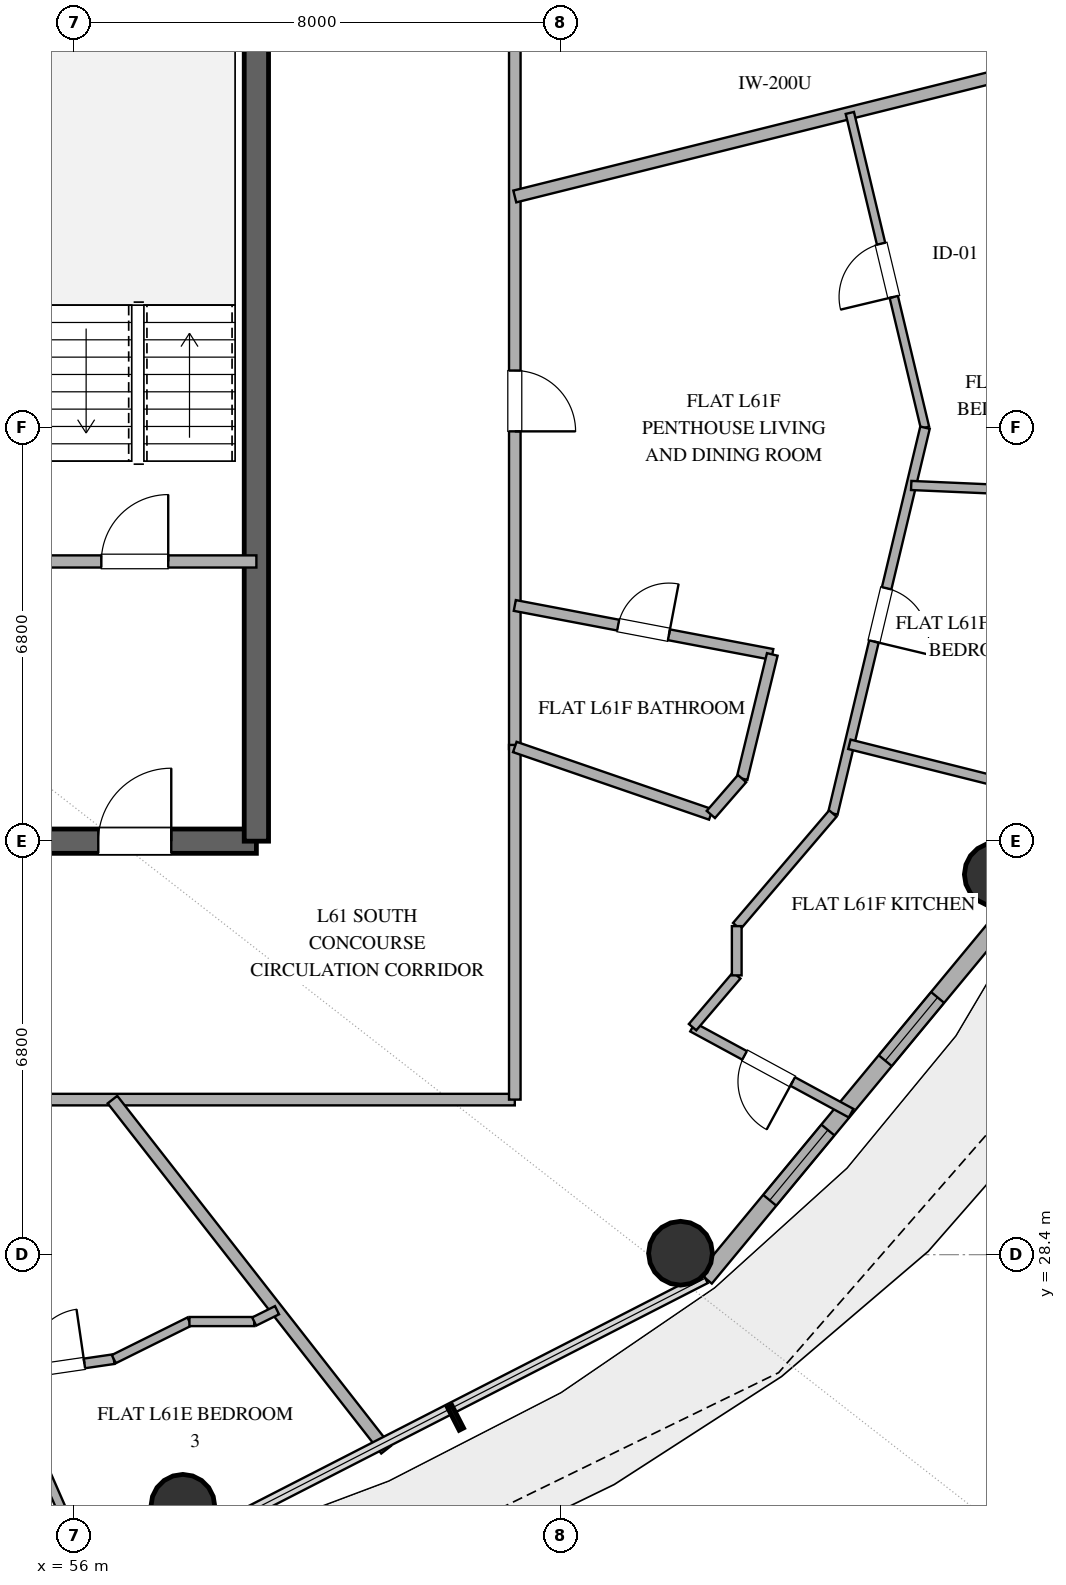
"""IFC4 building model, lengths in metres.
Left out: names, types, materials, properties, quantities, classifications, styles, units other than length and angle.
Written with IfcOpenShell. Run it as: python <this file> out.ifc"""

import sys

from ifc_helpers import new_model, si_unit, direction, frame, frame_2d, origin, origin_2d, place, context, subcontext, project, spatial, rectangle, hollow_circle, extrude, element, fill, save


model = new_model("IFC4")
c1 = context("Model", 3, precision=1e-05, world=origin(), true_north=direction((0.0, 1.0)))
c2 = subcontext(c1, "Body", "Model", "MODEL_VIEW")
j1 = project(units=[si_unit("LENGTHUNIT", "METRE"), si_unit("PLANEANGLEUNIT", "RADIAN")], contexts=[c1])
p1 = place(None, origin())
s1 = spatial("IfcSite", under=j1, at=p1, CompositionType="ELEMENT")
p2 = place(p1, origin())
s2 = spatial("IfcBuilding", under=s1, at=p2, CompositionType="ELEMENT")
p3 = place(p2, frame((0.0, 0.0, 238.8)))
s3 = spatial("IfcBuildingStorey", under=s2, at=p3, CompositionType="ELEMENT", Elevation=238.8)
p4 = place(p3, frame((55.0, 35.2, 0.0), z_axis=(0.0, 0.0, 1.0), x_axis=(1.0, 0.0, 0.0)))
e1 = element("IfcWall", 1, at=p4, inside=s3, PredefinedType="SHEAR", context=c2, shape_type="SweptSolid", body=[
    extrude(rectangle(XDim=4.0, YDim=0.4, at=frame_2d((2.0, 0.0))), origin(), (0.0, 0.0, 1.0), 3.36),
])
p5 = place(p4, frame((1.4, 0.0, 0.0)))
e2 = element("IfcOpeningElement", 2, at=p5, cuts=e1, PredefinedType="OPENING", context=c2, shape_type="SweptSolid", body=[
    extrude(rectangle(XDim=1.2, YDim=2.15, at=frame_2d((0.6, 1.075))), frame((0.0, 0.21, 0.0), z_axis=(0.0, -1.0, 0.0), x_axis=(1.0, 0.0, 0.0)), (0.0, 0.0, 1.0), 0.42),
])
p6 = place(p3, frame((59.0, 35.2, 0.0), z_axis=(0.0, 0.0, 1.0), x_axis=(0.0, 1.0, 0.0)))
e3 = element("IfcWall", 3, at=p6, inside=s3, PredefinedType="SHEAR", context=c2, shape_type="SweptSolid", body=[
    extrude(rectangle(XDim=13.6, YDim=0.4, at=frame_2d((6.8, 0.0))), origin(), (0.0, 0.0, 1.0), 3.36),
])
for number, where, z_axis, x_axis in (
    (4, (57.791, 24.261, 0.0), (0.0, 0.0, 1.0), (1.0, 0.0, 0.0)),
    (5, (65.975, 28.424, 0.0), (0.0, 0.0, 1.0), (1.0, 0.0, 0.0)),
    (6, (71.169, 34.653, 0.0), (0.0, 0.0, 1.0), (1.0, 0.0, 0.0)),
):
    element("IfcColumn", number, at=place(p3, frame(where, z_axis=z_axis, x_axis=x_axis)), inside=s3, PredefinedType="COLUMN", context=c2, shape_type="SweptSolid", body=[
        extrude(hollow_circle(Radius=0.525, WallThickness=0.028, at=origin_2d()), origin(), (0.0, 0.0, 1.0), 3.36),
    ])
p7 = place(p3, frame((66.383, 28.013, 0.0), z_axis=(0.0, 0.0, 1.0), x_axis=(0.63761509934, 0.770355103243, 0.0)))
e7 = element("IfcWall", 7, at=p7, inside=s3, PredefinedType="SOLIDWALL", context=c2, shape_type="SweptSolid", body=[
    extrude(rectangle(XDim=8.33, YDim=0.28, at=frame_2d((4.165, 0.0))), origin(), (0.0, 0.0, 1.0), 3.36),
])
p8 = place(p7, frame((1.663, 0.0, 0.85)))
e8 = element("IfcOpeningElement", 8, at=p8, cuts=e7, PredefinedType="OPENING", context=c2, shape_type="SweptSolid", body=[
    extrude(rectangle(XDim=1.5, YDim=1.8, at=frame_2d((0.75, 0.9))), frame((0.0, 0.15, 0.0), z_axis=(0.0, -1.0, 0.0), x_axis=(1.0, 0.0, 0.0)), (0.0, 0.0, 1.0), 0.3),
])
p9 = place(p7, frame((4.643, 0.0, 0.85)))
e9 = element("IfcOpeningElement", 9, at=p9, cuts=e7, PredefinedType="OPENING", context=c2, shape_type="SweptSolid", body=[
    extrude(rectangle(XDim=1.35, YDim=1.8, at=frame_2d((0.675, 0.9))), frame((0.0, 0.15, 0.0), z_axis=(0.0, -1.0, 0.0), x_axis=(1.0, 0.0, 0.0)), (0.0, 0.0, 1.0), 0.3),
])
p10 = place(p3, frame((55.0, 39.8, 0.0), z_axis=(0.0, 0.0, 1.0), x_axis=(1.0, 0.0, 0.0)))
e10 = element("IfcWall", 10, at=p10, inside=s3, PredefinedType="SOLIDWALL", context=c2, shape_type="SweptSolid", body=[
    extrude(rectangle(XDim=4.0, YDim=0.2, at=frame_2d((2.0, 0.0))), origin(), (0.0, 0.0, 1.0), 2.72),
])
p11 = place(p10, frame((1.45, 0.0, 0.0)))
e11 = element("IfcOpeningElement", 11, at=p11, cuts=e10, PredefinedType="OPENING", context=c2, shape_type="SweptSolid", body=[
    extrude(rectangle(XDim=1.1, YDim=2.15, at=frame_2d((0.55, 1.075))), frame((0.0, 0.11, 0.0), z_axis=(0.0, -1.0, 0.0), x_axis=(1.0, 0.0, 0.0)), (0.0, 0.0, 1.0), 0.22),
])
p12 = place(p3, frame((63.25, 30.95, 0.0), z_axis=(0.0, 0.0, 1.0), x_axis=(-1.0, 0.0, 0.0)))
e12 = element("IfcWall", 12, at=p12, inside=s3, PredefinedType="PARTITIONING", context=c2, shape_type="SweptSolid", body=[
    extrude(rectangle(XDim=19.715, YDim=0.19, at=frame_2d((9.857, 0.0))), origin(), (0.0, 0.0, 1.0), 2.72),
])
p13 = place(p12, frame((11.632, 0.0, 0.0)))
e13 = element("IfcOpeningElement", 13, at=p13, cuts=e12, PredefinedType="OPENING", context=c2, shape_type="SweptSolid", body=[
    extrude(rectangle(XDim=1.0, YDim=2.2, at=frame_2d((0.5, 1.1))), frame((0.0, 0.105, 0.0), z_axis=(0.0, -1.0, 0.0), x_axis=(1.0, 0.0, 0.0)), (0.0, 0.0, 1.0), 0.21),
])
p14 = place(p3, frame((63.25, 53.05, 0.0), z_axis=(0.0, 0.0, 1.0), x_axis=(0.0, -1.0, 0.0)))
e14 = element("IfcWall", 14, at=p14, inside=s3, PredefinedType="PARTITIONING", context=c2, shape_type="SweptSolid", body=[
    extrude(rectangle(XDim=16.335, YDim=0.19, at=frame_2d((8.167, 0.0))), origin(), (0.0, 0.0, 1.0), 2.72),
])
p15 = place(p14, frame((3.14, 0.0, 0.0)))
e15 = element("IfcOpeningElement", 15, at=p15, cuts=e14, PredefinedType="OPENING", context=c2, shape_type="SweptSolid", body=[
    extrude(rectangle(XDim=1.0, YDim=2.2, at=frame_2d((0.5, 1.1))), frame((0.0, 0.105, 0.0), z_axis=(0.0, -1.0, 0.0), x_axis=(1.0, 0.0, 0.0)), (0.0, 0.0, 1.0), 0.21),
])
p16 = place(p14, frame((10.111, 0.0, 0.0)))
e16 = element("IfcOpeningElement", 16, at=p16, cuts=e14, PredefinedType="OPENING", context=c2, shape_type="SweptSolid", body=[
    extrude(rectangle(XDim=1.0, YDim=2.2, at=frame_2d((0.5, 1.1))), frame((0.0, 0.105, 0.0), z_axis=(0.0, -1.0, 0.0), x_axis=(1.0, 0.0, 0.0)), (0.0, 0.0, 1.0), 0.21),
])
p17 = place(p3, frame((63.25, 36.783, 0.0), z_axis=(0.0, 0.0, 1.0), x_axis=(0.0, -1.0, 0.0)))
e17 = element("IfcWall", 17, at=p17, inside=s3, PredefinedType="PARTITIONING", context=c2, shape_type="SweptSolid", body=[
    extrude(rectangle(XDim=5.833, YDim=0.19, at=frame_2d((2.917, 0.0))), origin(), (0.0, 0.0, 1.0), 2.72),
])
p18 = place(p3, frame((63.25, 45.802, 0.0), z_axis=(0.0, 0.0, 1.0), x_axis=(0.970293772743, 0.241929730659, 0.0)))
e18 = element("IfcWall", 18, at=p18, inside=s3, PredefinedType="PARTITIONING", context=c2, shape_type="SweptSolid", body=[
    extrude(rectangle(XDim=9.197, YDim=0.2, at=frame_2d((4.599, 0.0))), origin(), (0.0, 0.0, 1.0), 2.72),
])
p19 = place(p3, frame((69.996, 42.0, 0.0), z_axis=(0.0, 0.0, 1.0), x_axis=(-0.232321322639, 0.972639091877, 0.0)))
e19 = element("IfcWall", 19, at=p19, inside=s3, PredefinedType="PARTITIONING", context=c2, shape_type="SweptSolid", body=[
    extrude(rectangle(XDim=5.322, YDim=0.14, at=frame_2d((2.661, 0.0))), origin(), (0.0, 0.0, 1.0), 2.72),
])
p20 = place(p19, frame((2.211, 0.0, 0.0)))
e20 = element("IfcOpeningElement", 20, at=p20, cuts=e19, PredefinedType="OPENING", context=c2, shape_type="SweptSolid", body=[
    extrude(rectangle(XDim=0.9, YDim=2.1, at=frame_2d((0.45, 1.05))), frame((0.0, 0.08, 0.0), z_axis=(0.0, -1.0, 0.0), x_axis=(1.0, 0.0, 0.0)), (0.0, 0.0, 1.0), 0.16),
])
p21 = place(p3, frame((69.996, 42.0, 0.0), z_axis=(0.0, 0.0, 1.0), x_axis=(-0.232298462197, -0.972644551962, 0.0)))
e21 = element("IfcWall", 21, at=p21, inside=s3, PredefinedType="PLUMBINGWALL", context=c2, shape_type="SweptSolid", body=[
    extrude(rectangle(XDim=6.523, YDim=0.16, at=frame_2d((3.262, 0.0))), origin(), (0.0, 0.0, 1.0), 2.72),
])
p22 = place(p21, frame((2.715, 0.0, 0.0)))
e22 = element("IfcOpeningElement", 22, at=p22, cuts=e21, PredefinedType="OPENING", context=c2, shape_type="SweptSolid", body=[
    extrude(rectangle(XDim=0.9, YDim=2.1, at=frame_2d((0.45, 1.05))), frame((0.0, 0.09, 0.0), z_axis=(0.0, -1.0, 0.0), x_axis=(1.0, 0.0, 0.0)), (0.0, 0.0, 1.0), 0.18),
])
p23 = place(p3, frame((56.633, 30.95, 0.0), z_axis=(0.0, 0.0, 1.0), x_axis=(0.615657656631, -0.788013737083, 0.0)))
e23 = element("IfcWall", 23, at=p23, inside=s3, PredefinedType="PARTITIONING", context=c2, shape_type="SweptSolid", body=[
    extrude(rectangle(XDim=7.308, YDim=0.2, at=frame_2d((3.654, 0.0))), origin(), (0.0, 0.0, 1.0), 2.72),
])
p24 = place(p3, frame((63.25, 39.076, 0.0), z_axis=(0.0, 0.0, 1.0), x_axis=(0.982398995864, -0.186794574134, 0.0)))
e24 = element("IfcWall", 24, at=p24, inside=s3, PredefinedType="PLUMBINGWALL", context=c2, shape_type="SweptSolid", body=[
    extrude(rectangle(XDim=4.311, YDim=0.18, at=frame_2d((2.155, 0.0))), origin(), (0.0, 0.0, 1.0), 2.72),
])
p25 = place(p24, frame((1.73, 0.0, 0.0)))
e25 = element("IfcOpeningElement", 25, at=p25, cuts=e24, PredefinedType="OPENING", context=c2, shape_type="SweptSolid", body=[
    extrude(rectangle(XDim=0.85, YDim=2.1, at=frame_2d((0.425, 1.05))), frame((0.0, 0.1, 0.0), z_axis=(0.0, -1.0, 0.0), x_axis=(1.0, 0.0, 0.0)), (0.0, 0.0, 1.0), 0.2),
])
p26 = place(p3, frame((73.312, 40.895, 0.0), z_axis=(0.0, 0.0, 1.0), x_axis=(-0.999049912793, 0.043580635022, 0.0)))
e26 = element("IfcWall", 26, at=p26, inside=s3, PredefinedType="PARTITIONING", context=c2, shape_type="SweptSolid", body=[
    extrude(rectangle(XDim=3.546, YDim=0.15, at=frame_2d((1.773, 0.0))), origin(), (0.0, 0.0, 1.0), 2.72),
])
p27 = place(p3, frame((72.166, 35.937, 0.0), z_axis=(0.0, 0.0, 1.0), x_axis=(-0.96994628441, 0.24331914302, 0.0)))
e27 = element("IfcWall", 27, at=p27, inside=s3, PredefinedType="PLUMBINGWALL", context=c2, shape_type="SweptSolid", body=[
    extrude(rectangle(XDim=3.519, YDim=0.16, at=frame_2d((1.759, 0.0))), origin(), (0.0, 0.0, 1.0), 2.72),
])
p28 = place(p3, frame((66.474, 35.639, 0.0), z_axis=(0.0, 0.0, 1.0), x_axis=(-0.945522773294, 0.325555963211, 0.0)))
e28 = element("IfcWall", 28, at=p28, inside=s3, PredefinedType="PLUMBINGWALL", context=c2, shape_type="SweptSolid", body=[
    extrude(rectangle(XDim=3.41, YDim=0.18, at=frame_2d((1.705, 0.0))), origin(), (0.0, 0.0, 1.0), 2.72),
])
p29 = place(p3, frame((48.0, 25.42, 0.0), z_axis=(0.0, 0.0, 1.0), x_axis=(0.989540121389, 0.144257922351, 0.0)))
e29 = element("IfcWall", 29, at=p29, inside=s3, PredefinedType="PLUMBINGWALL", context=c2, shape_type="SweptSolid", body=[
    extrude(rectangle(XDim=8.746, YDim=0.16, at=frame_2d((4.373, 0.0))), origin(), (0.0, 0.0, 1.0), 2.72),
])
p30 = place(p29, frame((4.765, 0.0, 0.0)))
e30 = element("IfcOpeningElement", 30, at=p30, cuts=e29, PredefinedType="OPENING", context=c2, shape_type="SweptSolid", body=[
    extrude(rectangle(XDim=0.9, YDim=2.1, at=frame_2d((0.45, 1.05))), frame((0.0, 0.09, 0.0), z_axis=(0.0, -1.0, 0.0), x_axis=(1.0, 0.0, 0.0)), (0.0, 0.0, 1.0), 0.18),
])
p31 = place(p29, frame((1.927, 0.0, 0.0)))
e31 = element("IfcOpeningElement", 31, at=p31, cuts=e29, PredefinedType="OPENING", context=c2, shape_type="SweptSolid", body=[
    extrude(rectangle(XDim=0.9, YDim=2.1, at=frame_2d((0.45, 1.05))), frame((0.0, 0.09, 0.0), z_axis=(0.0, -1.0, 0.0), x_axis=(1.0, 0.0, 0.0)), (0.0, 0.0, 1.0), 0.18),
])
p32 = place(p29, frame((7.358, 0.0, 0.0)))
e32 = element("IfcOpeningElement", 32, at=p32, cuts=e29, PredefinedType="OPENING", context=c2, shape_type="SweptSolid", body=[
    extrude(rectangle(XDim=0.9, YDim=2.1, at=frame_2d((0.45, 1.05))), frame((0.0, 0.09, 0.0), z_axis=(0.0, -1.0, 0.0), x_axis=(1.0, 0.0, 0.0)), (0.0, 0.0, 1.0), 0.18),
])
p33 = place(p3, frame((54.831, 26.416, 0.0), z_axis=(0.0, 0.0, 1.0), x_axis=(0.401469388376, -0.915872442099, 0.0)))
e33 = element("IfcWall", 33, at=p33, inside=s3, PredefinedType="PARTITIONING", context=c2, shape_type="SweptSolid", body=[
    extrude(rectangle(XDim=3.366, YDim=0.15, at=frame_2d((1.683, 0.0))), origin(), (0.0, 0.0, 1.0), 2.72),
])
p34 = place(p3, frame((68.781, 30.727, 0.0), z_axis=(0.0, 0.0, 1.0), x_axis=(-0.878981574643, 0.476855734408, 0.0)))
e34 = element("IfcWall", 34, at=p34, inside=s3, PredefinedType="PLUMBINGWALL", context=c2, shape_type="SweptSolid", body=[
    extrude(rectangle(XDim=2.966, YDim=0.16, at=frame_2d((1.483, 0.0))), origin(), (0.0, 0.0, 1.0), 2.72),
])
p35 = place(p34, frame((1.093, 0.0, 0.0)))
e35 = element("IfcOpeningElement", 35, at=p35, cuts=e34, PredefinedType="OPENING", context=c2, shape_type="SweptSolid", body=[
    extrude(rectangle(XDim=0.9, YDim=2.1, at=frame_2d((0.45, 1.05))), frame((0.0, 0.09, 0.0), z_axis=(0.0, -1.0, 0.0), x_axis=(1.0, 0.0, 0.0)), (0.0, 0.0, 1.0), 0.18),
])
p36 = place(p3, frame((66.9, 33.803, 0.0), z_axis=(0.0, 0.0, 1.0), x_axis=(0.649270866973, 0.760557257082, 0.0)))
e36 = element("IfcWall", 36, at=p36, inside=s3, PredefinedType="PLUMBINGWALL", context=c2, shape_type="SweptSolid", body=[
    extrude(rectangle(XDim=2.435, YDim=0.16, at=frame_2d((1.218, 0.0))), origin(), (0.0, 0.0, 1.0), 2.72),
])
p37 = place(p3, frame((67.485, 38.271, 0.0), z_axis=(0.0, 0.0, 1.0), x_axis=(-0.236517575433, -0.971627210668, 0.0)))
e37 = element("IfcWall", 37, at=p37, inside=s3, PredefinedType="PLUMBINGWALL", context=c2, shape_type="SweptSolid", body=[
    extrude(rectangle(XDim=2.102, YDim=0.18, at=frame_2d((1.051, 0.0))), origin(), (0.0, 0.0, 1.0), 2.72),
])
p38 = place(p3, frame((57.899, 27.3, 0.0), z_axis=(0.0, 0.0, 1.0), x_axis=(-0.895584310315, -0.444891833053, 0.0)))
e38 = element("IfcWall", 38, at=p38, inside=s3, PredefinedType="PARTITIONING", context=c2, shape_type="SweptSolid", body=[
    extrude(rectangle(XDim=1.389, YDim=0.15, at=frame_2d((0.694, 0.0))), origin(), (0.0, 0.0, 1.0), 2.72),
])
p39 = place(p3, frame((66.174, 32.141, 0.0), z_axis=(0.0, 0.0, 1.0), x_axis=(0.648939178463, 0.760840287219, 0.0)))
e39 = element("IfcWall", 39, at=p39, inside=s3, PredefinedType="PLUMBINGWALL", context=c2, shape_type="SweptSolid", body=[
    extrude(rectangle(XDim=1.119, YDim=0.16, at=frame_2d((0.56, 0.0))), origin(), (0.0, 0.0, 1.0), 2.72),
])
p40 = place(p3, frame((58.964, 27.3, 0.0), z_axis=(0.0, 0.0, 1.0), x_axis=(-1.0, 0.0, 0.0)))
e40 = element("IfcWall", 40, at=p40, inside=s3, PredefinedType="PARTITIONING", context=c2, shape_type="SweptSolid", body=[
    extrude(rectangle(XDim=1.065, YDim=0.15, at=frame_2d((0.533, 0.0))), origin(), (0.0, 0.0, 1.0), 2.72),
])
p41 = place(p3, frame((66.9, 32.993, 0.0), z_axis=(0.0, 0.0, 1.0), x_axis=(0.0, 1.0, 0.0)))
e41 = element("IfcWall", 41, at=p41, inside=s3, PredefinedType="PLUMBINGWALL", context=c2, shape_type="SweptSolid", body=[
    extrude(rectangle(XDim=0.81, YDim=0.16, at=frame_2d((0.405, 0.0))), origin(), (0.0, 0.0, 1.0), 2.72),
])
p42 = place(p3, frame((66.988, 36.229, 0.0), z_axis=(0.0, 0.0, 1.0), x_axis=(-0.656402785683, -0.754410619589, 0.0)))
e42 = element("IfcWall", 42, at=p42, inside=s3, PredefinedType="PLUMBINGWALL", context=c2, shape_type="SweptSolid", body=[
    extrude(rectangle(XDim=0.782, YDim=0.18, at=frame_2d((0.391, 0.0))), origin(), (0.0, 0.0, 1.0), 2.72),
])
p43 = place(p3, frame((59.339, 27.487, 0.0), z_axis=(0.0, 0.0, 1.0), x_axis=(-0.895473432012, -0.445114965554, 0.0)))
e43 = element("IfcWall", 43, at=p43, inside=s3, PredefinedType="PARTITIONING", context=c2, shape_type="SweptSolid", body=[
    extrude(rectangle(XDim=0.419, YDim=0.15, at=frame_2d((0.209, 0.0))), origin(), (0.0, 0.0, 1.0), 2.72),
])
p44 = place(p8, origin())
e44 = element("IfcWindow", 44, at=p44, inside=s3, PartitioningType="SINGLE_PANEL", PredefinedType="WINDOW", context=c2, shape_type="SweptSolid", body=[
    extrude(rectangle(XDim=1.5, YDim=1.8, at=frame_2d((0.75, 0.9))), frame((0.0, 0.03, 0.0), z_axis=(0.0, -1.0, 0.0), x_axis=(1.0, 0.0, 0.0)), (0.0, 0.0, 1.0), 0.06),
])
fill(e8, e44)
p45 = place(p9, origin())
e45 = element("IfcWindow", 45, at=p45, inside=s3, PartitioningType="SINGLE_PANEL", PredefinedType="WINDOW", context=c2, shape_type="SweptSolid", body=[
    extrude(rectangle(XDim=1.35, YDim=1.8, at=frame_2d((0.675, 0.9))), frame((0.0, 0.03, 0.0), z_axis=(0.0, -1.0, 0.0), x_axis=(1.0, 0.0, 0.0)), (0.0, 0.0, 1.0), 0.06),
])
fill(e9, e45)
p46 = place(p5, origin())
e46 = element("IfcDoor", 46, at=p46, inside=s3, OperationType="SINGLE_SWING_RIGHT", PredefinedType="DOOR", context=c2, shape_type="SweptSolid", body=[
    extrude(rectangle(XDim=1.2, YDim=2.15, at=frame_2d((0.6, 1.075))), frame((0.0, 0.025, 0.0), z_axis=(0.0, -1.0, 0.0), x_axis=(1.0, 0.0, 0.0)), (0.0, 0.0, 1.0), 0.05),
])
fill(e2, e46)
p47 = place(p11, origin())
e47 = element("IfcDoor", 47, at=p47, inside=s3, OperationType="SINGLE_SWING_RIGHT", PredefinedType="DOOR", context=c2, shape_type="SweptSolid", body=[
    extrude(rectangle(XDim=1.1, YDim=2.15, at=frame_2d((0.55, 1.075))), frame((0.0, 0.025, 0.0), z_axis=(0.0, -1.0, 0.0), x_axis=(1.0, 0.0, 0.0)), (0.0, 0.0, 1.0), 0.05),
])
fill(e11, e47)
p48 = place(p16, origin())
e48 = element("IfcDoor", 48, at=p48, inside=s3, OperationType="SINGLE_SWING_RIGHT", PredefinedType="DOOR", context=c2, shape_type="SweptSolid", body=[
    extrude(rectangle(XDim=1.0, YDim=2.2, at=frame_2d((0.5, 1.1))), frame((0.0, 0.025, 0.0), z_axis=(0.0, -1.0, 0.0), x_axis=(1.0, 0.0, 0.0)), (0.0, 0.0, 1.0), 0.05),
])
fill(e16, e48)
p49 = place(p20, origin())
e49 = element("IfcDoor", 49, at=p49, inside=s3, OperationType="SINGLE_SWING_LEFT", PredefinedType="DOOR", context=c2, shape_type="SweptSolid", body=[
    extrude(rectangle(XDim=0.9, YDim=2.1, at=frame_2d((0.45, 1.05))), frame((0.0, 0.025, 0.0), z_axis=(0.0, -1.0, 0.0), x_axis=(1.0, 0.0, 0.0)), (0.0, 0.0, 1.0), 0.05),
])
fill(e20, e49)
p50 = place(p22, origin())
e50 = element("IfcDoor", 50, at=p50, inside=s3, OperationType="SINGLE_SWING_RIGHT", PredefinedType="DOOR", context=c2, shape_type="SweptSolid", body=[
    extrude(rectangle(XDim=0.9, YDim=2.1, at=frame_2d((0.45, 1.05))), frame((0.0, 0.025, 0.0), z_axis=(0.0, -1.0, 0.0), x_axis=(1.0, 0.0, 0.0)), (0.0, 0.0, 1.0), 0.05),
])
fill(e22, e50)
p51 = place(p25, origin())
e51 = element("IfcDoor", 51, at=p51, inside=s3, OperationType="SINGLE_SWING_RIGHT", PredefinedType="DOOR", context=c2, shape_type="SweptSolid", body=[
    extrude(rectangle(XDim=0.85, YDim=2.1, at=frame_2d((0.425, 1.05))), frame((0.0, 0.025, 0.0), z_axis=(0.0, -1.0, 0.0), x_axis=(1.0, 0.0, 0.0)), (0.0, 0.0, 1.0), 0.05),
])
fill(e25, e51)
p52 = place(p32, origin())
e52 = element("IfcDoor", 52, at=p52, inside=s3, OperationType="SINGLE_SWING_RIGHT", PredefinedType="DOOR", context=c2, shape_type="SweptSolid", body=[
    extrude(rectangle(XDim=0.9, YDim=2.1, at=frame_2d((0.45, 1.05))), frame((0.0, 0.025, 0.0), z_axis=(0.0, -1.0, 0.0), x_axis=(1.0, 0.0, 0.0)), (0.0, 0.0, 1.0), 0.05),
])
fill(e32, e52)
p53 = place(p35, origin())
e53 = element("IfcDoor", 53, at=p53, inside=s3, OperationType="SINGLE_SWING_LEFT", PredefinedType="DOOR", context=c2, shape_type="SweptSolid", body=[
    extrude(rectangle(XDim=0.9, YDim=2.1, at=frame_2d((0.45, 1.05))), frame((0.0, 0.025, 0.0), z_axis=(0.0, -1.0, 0.0), x_axis=(1.0, 0.0, 0.0)), (0.0, 0.0, 1.0), 0.05),
])
fill(e35, e53)
save(model, sys.argv[1])
